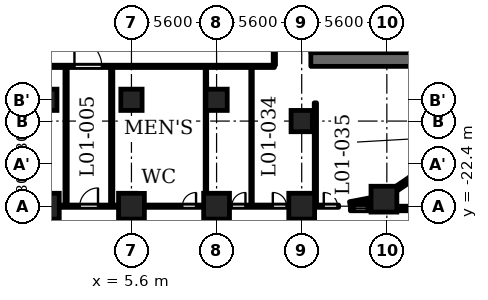
"""IFC4 building model, lengths in metres.
Left out: names, types, materials, properties, quantities, classifications, styles, units other than length and angle.
Written with IfcOpenShell. Run it as: python <this file> out.ifc"""

import sys

from ifc_helpers import new_model, si_unit, direction, frame, frame_2d, origin, origin_2d, place, context, subcontext, project, spatial, polyline, rectangle, outline, extrude, element, fill, save


model = new_model("IFC4")
c1 = context("Model", 3, precision=1e-05, world=origin(), true_north=direction((0.0, 1.0)))
c2 = subcontext(c1, "Body", "Model", "MODEL_VIEW")
j1 = project(units=[si_unit("LENGTHUNIT", "METRE"), si_unit("PLANEANGLEUNIT", "RADIAN")], contexts=[c1])
p1 = place(None, origin())
s1 = spatial("IfcSite", under=j1, at=p1, CompositionType="ELEMENT")
p2 = place(p1, origin())
s2 = spatial("IfcBuilding", under=s1, at=p2, CompositionType="ELEMENT")
p3 = place(p2, frame((0.0, 0.0, 6.5)))
s3 = spatial("IfcBuildingStorey", under=s2, at=p3, CompositionType="ELEMENT", Elevation=6.5)
for number, where, z_axis, x_axis in (
    (1, (0.0, -22.4, 0.0), (0.0, 0.0, 1.0), (1.0, 0.0, 0.0)),
    (2, (5.6, -22.4, 0.0), (0.0, 0.0, 1.0), (1.0, 0.0, 0.0)),
    (3, (11.2, -22.4, 0.0), (0.0, 0.0, 1.0), (1.0, 0.0, 0.0)),
    (4, (16.8, -22.4, 0.0), (0.0, 0.0, 1.0), (1.0, 0.0, 0.0)),
    (5, (22.209, -21.938, 0.0), (0.0, 0.0, 1.0), (1.0, 0.0, 0.0)),
):
    element("IfcColumn", number, at=place(p3, frame(where, z_axis=z_axis, x_axis=x_axis)), inside=s3, PredefinedType="COLUMN", context=c2, shape_type="SweptSolid", body=[
        extrude(rectangle(XDim=1.7, YDim=1.7, at=origin_2d()), origin(), (0.0, 0.0, 1.0), 4.8),
    ])
for number, where, z_axis, x_axis in (
    (6, (16.8, -16.8, 0.0), (0.0, 0.0, 1.0), (1.0, 0.0, 0.0)),
    (7, (0.0, -15.4, 0.0), (0.0, 0.0, 1.0), (1.0, 0.0, 0.0)),
    (8, (5.6, -15.4, 0.0), (0.0, 0.0, 1.0), (1.0, 0.0, 0.0)),
    (9, (11.2, -15.4, 0.0), (0.0, 0.0, 1.0), (1.0, 0.0, 0.0)),
):
    element("IfcColumn", number, at=place(p3, frame(where, z_axis=z_axis, x_axis=x_axis)), inside=s3, PredefinedType="COLUMN", context=c2, shape_type="SweptSolid", body=[
        extrude(rectangle(XDim=1.4, YDim=1.4, at=origin_2d()), origin(), (0.0, 0.0, 1.0), 4.8),
    ])
p4 = place(p3, frame((27.4, -22.55, 0.0), z_axis=(0.0, 0.0, 1.0), x_axis=(-1.0, 0.0, 0.0)))
e10 = element("IfcWall", 10, at=p4, inside=s3, PredefinedType="SOLIDWALL", context=c2, shape_type="SweptSolid", body=[
    extrude(rectangle(XDim=4.341, YDim=0.3, at=frame_2d((2.171, 0.0))), origin(), (0.0, 0.0, 1.0), 4.45),
])
p5 = place(p4, frame((1.571, 0.0, 0.6)))
e11 = element("IfcOpeningElement", 11, at=p5, cuts=e10, PredefinedType="OPENING", context=c2, shape_type="SweptSolid", body=[
    extrude(rectangle(XDim=1.2, YDim=1.55, at=frame_2d((0.6, 0.775))), frame((0.0, 0.16, 0.0), z_axis=(0.0, -1.0, 0.0), x_axis=(1.0, 0.0, 0.0)), (0.0, 0.0, 1.0), 0.32),
])
p6 = place(p3, frame((21.359, -22.55, 0.0), z_axis=(0.0, 0.0, 1.0), x_axis=(-1.0, 0.0, 0.0)))
e12 = element("IfcWall", 12, at=p6, inside=s3, PredefinedType="SOLIDWALL", context=c2, shape_type="SweptSolid", body=[
    extrude(rectangle(XDim=1.359, YDim=0.3, at=frame_2d((0.679, 0.0))), origin(), (0.0, 0.0, 1.0), 3.55),
])
p7 = place(p6, frame((0.279, 0.0, 0.6)))
e13 = element("IfcOpeningElement", 13, at=p7, cuts=e12, PredefinedType="OPENING", context=c2, shape_type="SweptSolid", body=[
    extrude(rectangle(XDim=0.8, YDim=1.55, at=frame_2d((0.4, 0.775))), frame((0.0, 0.16, 0.0), z_axis=(0.0, -1.0, 0.0), x_axis=(1.0, 0.0, 0.0)), (0.0, 0.0, 1.0), 0.32),
])
for number, where, z_axis, x_axis in (
    (14, (19.972, -22.253, 0.0), (0.0, 0.0, 1.0), (0.982, 0.187, 0.0)),
    (15, (22.85, -21.369, 0.0), (0.0, 0.0, 1.0), (0.827, 0.562, 0.0)),
):
    element("IfcWall", number, at=place(p3, frame(where, z_axis=z_axis, x_axis=x_axis)), inside=s3, PredefinedType="SOLIDWALL", context=c2, shape_type="SweptSolid", body=[
        extrude(rectangle(XDim=1.406, YDim=0.3, at=frame_2d((0.703, 0.0))), origin(), (0.0, 0.0, 1.0), 3.55),
    ])
p8 = place(p3, frame((17.4, -12.75, 0.0), z_axis=(0.0, 0.0, 1.0), x_axis=(1.0, 0.0, 0.0)))
e16 = element("IfcWall", 16, at=p8, inside=s3, PredefinedType="SHEAR", context=c2, shape_type="SweptSolid", body=[
    extrude(rectangle(XDim=10.4, YDim=0.9, at=frame_2d((5.2, 0.0))), origin(), (0.0, 0.0, 1.0), 4.45),
])
p9 = place(p3, frame((17.6, -12.3, 0.0), z_axis=(0.0, 0.0, 1.0), x_axis=(0.0, 1.0, 0.0)))
e17 = element("IfcWall", 17, at=p9, inside=s3, PredefinedType="SHEAR", context=c2, shape_type="SweptSolid", body=[
    extrude(rectangle(XDim=24.6, YDim=0.4, at=frame_2d((12.3, 0.0))), origin(), (0.0, 0.0, 1.0), 4.45),
])
p10 = place(p9, frame((6.0, 0.0, 0.0)))
e18 = element("IfcOpeningElement", 18, at=p10, cuts=e17, PredefinedType="OPENING", context=c2, shape_type="SweptSolid", body=[
    extrude(rectangle(XDim=1.1, YDim=2.1, at=frame_2d((0.55, 1.05))), frame((0.0, 0.21, 0.0), z_axis=(0.0, -1.0, 0.0), x_axis=(1.0, 0.0, 0.0)), (0.0, 0.0, 1.0), 0.42),
])
p11 = place(p9, frame((8.4, 0.0, 0.0)))
e19 = element("IfcOpeningElement", 19, at=p11, cuts=e17, PredefinedType="OPENING", context=c2, shape_type="SweptSolid", body=[
    extrude(rectangle(XDim=1.1, YDim=2.1, at=frame_2d((0.55, 1.05))), frame((0.0, 0.21, 0.0), z_axis=(0.0, -1.0, 0.0), x_axis=(1.0, 0.0, 0.0)), (0.0, 0.0, 1.0), 0.42),
])
p12 = place(p9, frame((10.8, 0.0, 0.0)))
e20 = element("IfcOpeningElement", 20, at=p12, cuts=e17, PredefinedType="OPENING", context=c2, shape_type="SweptSolid", body=[
    extrude(rectangle(XDim=1.1, YDim=2.1, at=frame_2d((0.55, 1.05))), frame((0.0, 0.21, 0.0), z_axis=(0.0, -1.0, 0.0), x_axis=(1.0, 0.0, 0.0)), (0.0, 0.0, 1.0), 0.42),
])
p13 = place(p9, frame((16.75, 0.0, 0.0)))
e21 = element("IfcOpeningElement", 21, at=p13, cuts=e17, PredefinedType="OPENING", context=c2, shape_type="SweptSolid", body=[
    extrude(rectangle(XDim=0.9, YDim=2.1, at=frame_2d((0.45, 1.05))), frame((0.0, 0.21, 0.0), z_axis=(0.0, -1.0, 0.0), x_axis=(1.0, 0.0, 0.0)), (0.0, 0.0, 1.0), 0.42),
])
p14 = place(p9, frame((22.8, 0.0, 0.0)))
e22 = element("IfcOpeningElement", 22, at=p14, cuts=e17, PredefinedType="OPENING", context=c2, shape_type="SweptSolid", body=[
    extrude(rectangle(XDim=1.1, YDim=2.1, at=frame_2d((0.55, 1.05))), frame((0.0, 0.21, 0.0), z_axis=(0.0, -1.0, 0.0), x_axis=(1.0, 0.0, 0.0)), (0.0, 0.0, 1.0), 0.42),
])
p15 = place(p9, frame((0.7, 0.0, 0.0)))
e23 = element("IfcOpeningElement", 23, at=p15, cuts=e17, PredefinedType="OPENING", context=c2, shape_type="SweptSolid", body=[
    extrude(rectangle(XDim=1.1, YDim=2.1, at=frame_2d((0.55, 1.05))), frame((0.0, 0.21, 0.0), z_axis=(0.0, -1.0, 0.0), x_axis=(1.0, 0.0, 0.0)), (0.0, 0.0, 1.0), 0.42),
])
p16 = place(p9, frame((12.775, 0.0, 0.0)))
e24 = element("IfcOpeningElement", 24, at=p16, cuts=e17, PredefinedType="OPENING", context=c2, shape_type="SweptSolid", body=[
    extrude(rectangle(XDim=1.8, YDim=2.1, at=frame_2d((0.9, 1.05))), frame((0.0, 0.21, 0.0), z_axis=(0.0, -1.0, 0.0), x_axis=(1.0, 0.0, 0.0)), (0.0, 0.0, 1.0), 0.42),
])
p17 = place(p3, frame((23.55, -12.3, 0.0), z_axis=(0.0, 0.0, 1.0), x_axis=(0.0, 1.0, 0.0)))
e25 = element("IfcWall", 25, at=p17, inside=s3, PredefinedType="PARTITIONING", context=c2, shape_type="SweptSolid", body=[
    extrude(rectangle(XDim=2.5, YDim=0.2, at=frame_2d((1.25, 0.0))), origin(), (0.0, 0.0, 1.0), 4.45),
])
p18 = place(p17, frame((0.8, 0.0, 0.0)))
e26 = element("IfcOpeningElement", 26, at=p18, cuts=e25, PredefinedType="OPENING", context=c2, shape_type="SweptSolid", body=[
    extrude(rectangle(XDim=0.9, YDim=2.1, at=frame_2d((0.45, 1.05))), frame((0.0, 0.11, 0.0), z_axis=(0.0, -1.0, 0.0), x_axis=(1.0, 0.0, 0.0)), (0.0, 0.0, 1.0), 0.22),
])
p19 = place(p3, frame((-18.98, -22.4, 0.0), z_axis=(0.0, 0.0, 1.0), x_axis=(1.0, 0.0, 0.0)))
e27 = element("IfcWall", 27, at=p19, inside=s3, PredefinedType="PARTITIONING", context=c2, shape_type="SweptSolid", body=[
    extrude(rectangle(XDim=38.211, YDim=0.15, at=frame_2d((19.105, 0.0))), origin(), (0.0, 0.0, 1.0), 3.55),
])
p20 = place(p19, frame((21.18, 0.0, 0.0)))
e28 = element("IfcOpeningElement", 28, at=p20, cuts=e27, PredefinedType="OPENING", context=c2, shape_type="SweptSolid", body=[
    extrude(rectangle(XDim=1.2, YDim=2.1, at=frame_2d((0.6, 1.05))), frame((0.0, 0.085, 0.0), z_axis=(0.0, -1.0, 0.0), x_axis=(1.0, 0.0, 0.0)), (0.0, 0.0, 1.0), 0.17),
])
p21 = place(p19, frame((0.08, 0.0, 0.0)))
e29 = element("IfcOpeningElement", 29, at=p21, cuts=e27, PredefinedType="OPENING", context=c2, shape_type="SweptSolid", body=[
    extrude(rectangle(XDim=1.0, YDim=2.1, at=frame_2d((0.5, 1.05))), frame((0.0, 0.085, 0.0), z_axis=(0.0, -1.0, 0.0), x_axis=(1.0, 0.0, 0.0)), (0.0, 0.0, 1.0), 0.17),
])
p22 = place(p19, frame((3.63, 0.0, 0.0)))
e30 = element("IfcOpeningElement", 30, at=p22, cuts=e27, PredefinedType="OPENING", context=c2, shape_type="SweptSolid", body=[
    extrude(rectangle(XDim=1.0, YDim=2.1, at=frame_2d((0.5, 1.05))), frame((0.0, 0.085, 0.0), z_axis=(0.0, -1.0, 0.0), x_axis=(1.0, 0.0, 0.0)), (0.0, 0.0, 1.0), 0.17),
])
p23 = place(p19, frame((27.93, 0.0, 0.0)))
e31 = element("IfcOpeningElement", 31, at=p23, cuts=e27, PredefinedType="OPENING", context=c2, shape_type="SweptSolid", body=[
    extrude(rectangle(XDim=0.9, YDim=2.1, at=frame_2d((0.45, 1.05))), frame((0.0, 0.085, 0.0), z_axis=(0.0, -1.0, 0.0), x_axis=(1.0, 0.0, 0.0)), (0.0, 0.0, 1.0), 0.17),
])
p24 = place(p19, frame((31.18, 0.0, 0.0)))
e32 = element("IfcOpeningElement", 32, at=p24, cuts=e27, PredefinedType="OPENING", context=c2, shape_type="SweptSolid", body=[
    extrude(rectangle(XDim=0.9, YDim=2.1, at=frame_2d((0.45, 1.05))), frame((0.0, 0.085, 0.0), z_axis=(0.0, -1.0, 0.0), x_axis=(1.0, 0.0, 0.0)), (0.0, 0.0, 1.0), 0.17),
])
p25 = place(p19, frame((33.88, 0.0, 0.0)))
e33 = element("IfcOpeningElement", 33, at=p25, cuts=e27, PredefinedType="OPENING", context=c2, shape_type="SweptSolid", body=[
    extrude(rectangle(XDim=0.9, YDim=2.1, at=frame_2d((0.45, 1.05))), frame((0.0, 0.085, 0.0), z_axis=(0.0, -1.0, 0.0), x_axis=(1.0, 0.0, 0.0)), (0.0, 0.0, 1.0), 0.17),
])
p26 = place(p19, frame((37.231, 0.0, 0.0)))
e34 = element("IfcOpeningElement", 34, at=p26, cuts=e27, PredefinedType="OPENING", context=c2, shape_type="SweptSolid", body=[
    extrude(rectangle(XDim=0.9, YDim=2.1, at=frame_2d((0.45, 1.05))), frame((0.0, 0.085, 0.0), z_axis=(0.0, -1.0, 0.0), x_axis=(1.0, 0.0, 0.0)), (0.0, 0.0, 1.0), 0.17),
])
p27 = place(p3, frame((-15.005, -13.2, 0.0), z_axis=(0.0, 0.0, 1.0), x_axis=(1.0, 0.0, 0.0)))
e35 = element("IfcWall", 35, at=p27, inside=s3, PredefinedType="PARTITIONING", context=c2, shape_type="SweptSolid", body=[
    extrude(rectangle(XDim=30.01, YDim=0.15, at=frame_2d((15.005, 0.0))), origin(), (0.0, 0.0, 1.0), 4.45),
])
p28 = place(p27, frame((16.855, 0.0, 0.0)))
e36 = element("IfcOpeningElement", 36, at=p28, cuts=e35, PredefinedType="OPENING", context=c2, shape_type="SweptSolid", body=[
    extrude(rectangle(XDim=1.8, YDim=2.1, at=frame_2d((0.9, 1.05))), frame((0.0, 0.085, 0.0), z_axis=(0.0, -1.0, 0.0), x_axis=(1.0, 0.0, 0.0)), (0.0, 0.0, 1.0), 0.17),
])
for number, where, z_axis, x_axis in (
    (37, (1.3, -22.325, 0.0), (0.0, 0.0, 1.0), (0.0, 1.0, 0.0)),
    (38, (4.3, -22.325, 0.0), (0.0, 0.0, 1.0), (0.0, 1.0, 0.0)),
):
    element("IfcWall", number, at=place(p3, frame(where, z_axis=z_axis, x_axis=x_axis)), inside=s3, PredefinedType="PARTITIONING", context=c2, shape_type="SweptSolid", body=[
        extrude(rectangle(XDim=9.05, YDim=0.15, at=frame_2d((4.525, 0.0))), origin(), (0.0, 0.0, 1.0), 4.45),
    ])
for number, where, z_axis, x_axis in (
    (39, (10.5, -22.325, 0.0), (0.0, 0.0, 1.0), (0.0, 1.0, 0.0)),
    (40, (13.5, -22.325, 0.0), (0.0, 0.0, 1.0), (0.0, 1.0, 0.0)),
):
    element("IfcWall", number, at=place(p3, frame(where, z_axis=z_axis, x_axis=x_axis)), inside=s3, PredefinedType="PARTITIONING", context=c2, shape_type="SweptSolid", body=[
        extrude(rectangle(XDim=9.05, YDim=0.1, at=frame_2d((4.525, 0.0))), origin(), (0.0, 0.0, 1.0), 4.45),
    ])
p29 = place(p3, frame((15.0, -13.125, 0.0), z_axis=(0.0, 0.0, 1.0), x_axis=(0.0, 1.0, 0.0)))
e41 = element("IfcWall", 41, at=p29, inside=s3, PredefinedType="PARTITIONING", context=c2, shape_type="SweptSolid", body=[
    extrude(rectangle(XDim=6.356, YDim=0.15, at=frame_2d((3.178, 0.0))), origin(), (0.0, 0.0, 1.0), 4.45),
])
p30 = place(p3, frame((17.7, -22.325, 0.0), z_axis=(0.0, 0.0, 1.0), x_axis=(0.0, 1.0, 0.0)))
e42 = element("IfcWall", 42, at=p30, inside=s3, PredefinedType="PARTITIONING", context=c2, shape_type="SweptSolid", body=[
    extrude(rectangle(XDim=6.725, YDim=0.15, at=frame_2d((3.362, 0.0))), origin(), (0.0, 0.0, 1.0), 4.45),
])
p31 = place(p3, origin())
e43 = element("IfcWall", 43, at=p31, inside=s3, PredefinedType="SOLIDWALL", context=c2, shape_type="SweptSolid", body=[
    extrude(outline(polyline([(19.944, -22.105), (19.251, -22.238), (19.251, -22.7), (20.0, -22.7), (20.0, -22.4), (19.944, -22.105)])), origin(), (0.0, 0.0, 1.0), 3.55),
])
p32 = place(p28, origin())
e44 = element("IfcDoor", 44, at=p32, inside=s3, OperationType="SINGLE_SWING_RIGHT", PredefinedType="DOOR", context=c2, shape_type="SweptSolid", body=[
    extrude(rectangle(XDim=1.8, YDim=2.1, at=frame_2d((0.9, 1.05))), frame((0.0, 0.025, 0.0), z_axis=(0.0, -1.0, 0.0), x_axis=(1.0, 0.0, 0.0)), (0.0, 0.0, 1.0), 0.05),
])
fill(e36, e44)
p33 = place(p20, origin())
e45 = element("IfcDoor", 45, at=p33, inside=s3, OperationType="SINGLE_SWING_LEFT", PredefinedType="DOOR", context=c2, shape_type="SweptSolid", body=[
    extrude(rectangle(XDim=1.2, YDim=2.1, at=frame_2d((0.6, 1.05))), frame((0.0, 0.025, 0.0), z_axis=(0.0, -1.0, 0.0), x_axis=(1.0, 0.0, 0.0)), (0.0, 0.0, 1.0), 0.05),
])
fill(e28, e45)
p34 = place(p23, origin())
e46 = element("IfcDoor", 46, at=p34, inside=s3, OperationType="SINGLE_SWING_LEFT", PredefinedType="DOOR", context=c2, shape_type="SweptSolid", body=[
    extrude(rectangle(XDim=0.9, YDim=2.1, at=frame_2d((0.45, 1.05))), frame((0.0, 0.025, 0.0), z_axis=(0.0, -1.0, 0.0), x_axis=(1.0, 0.0, 0.0)), (0.0, 0.0, 1.0), 0.05),
])
fill(e31, e46)
p35 = place(p24, origin())
e47 = element("IfcDoor", 47, at=p35, inside=s3, OperationType="SINGLE_SWING_LEFT", PredefinedType="DOOR", context=c2, shape_type="SweptSolid", body=[
    extrude(rectangle(XDim=0.9, YDim=2.1, at=frame_2d((0.45, 1.05))), frame((0.0, 0.025, 0.0), z_axis=(0.0, -1.0, 0.0), x_axis=(1.0, 0.0, 0.0)), (0.0, 0.0, 1.0), 0.05),
])
fill(e32, e47)
p36 = place(p25, origin())
e48 = element("IfcDoor", 48, at=p36, inside=s3, OperationType="SINGLE_SWING_RIGHT", PredefinedType="DOOR", context=c2, shape_type="SweptSolid", body=[
    extrude(rectangle(XDim=0.9, YDim=2.1, at=frame_2d((0.45, 1.05))), frame((0.0, 0.025, 0.0), z_axis=(0.0, -1.0, 0.0), x_axis=(1.0, 0.0, 0.0)), (0.0, 0.0, 1.0), 0.05),
])
fill(e33, e48)
p37 = place(p26, origin())
e49 = element("IfcDoor", 49, at=p37, inside=s3, OperationType="SINGLE_SWING_RIGHT", PredefinedType="DOOR", context=c2, shape_type="SweptSolid", body=[
    extrude(rectangle(XDim=0.9, YDim=2.1, at=frame_2d((0.45, 1.05))), frame((0.0, 0.025, 0.0), z_axis=(0.0, -1.0, 0.0), x_axis=(1.0, 0.0, 0.0)), (0.0, 0.0, 1.0), 0.05),
])
fill(e34, e49)
p38 = place(p7, origin())
e50 = element("IfcWindow", 50, at=p38, inside=s3, PartitioningType="SINGLE_PANEL", PredefinedType="WINDOW", context=c2, shape_type="SweptSolid", body=[
    extrude(rectangle(XDim=0.8, YDim=1.55, at=frame_2d((0.4, 0.775))), frame((0.0, 0.03, 0.0), z_axis=(0.0, -1.0, 0.0), x_axis=(1.0, 0.0, 0.0)), (0.0, 0.0, 1.0), 0.06),
])
fill(e13, e50)
save(model, sys.argv[1])
